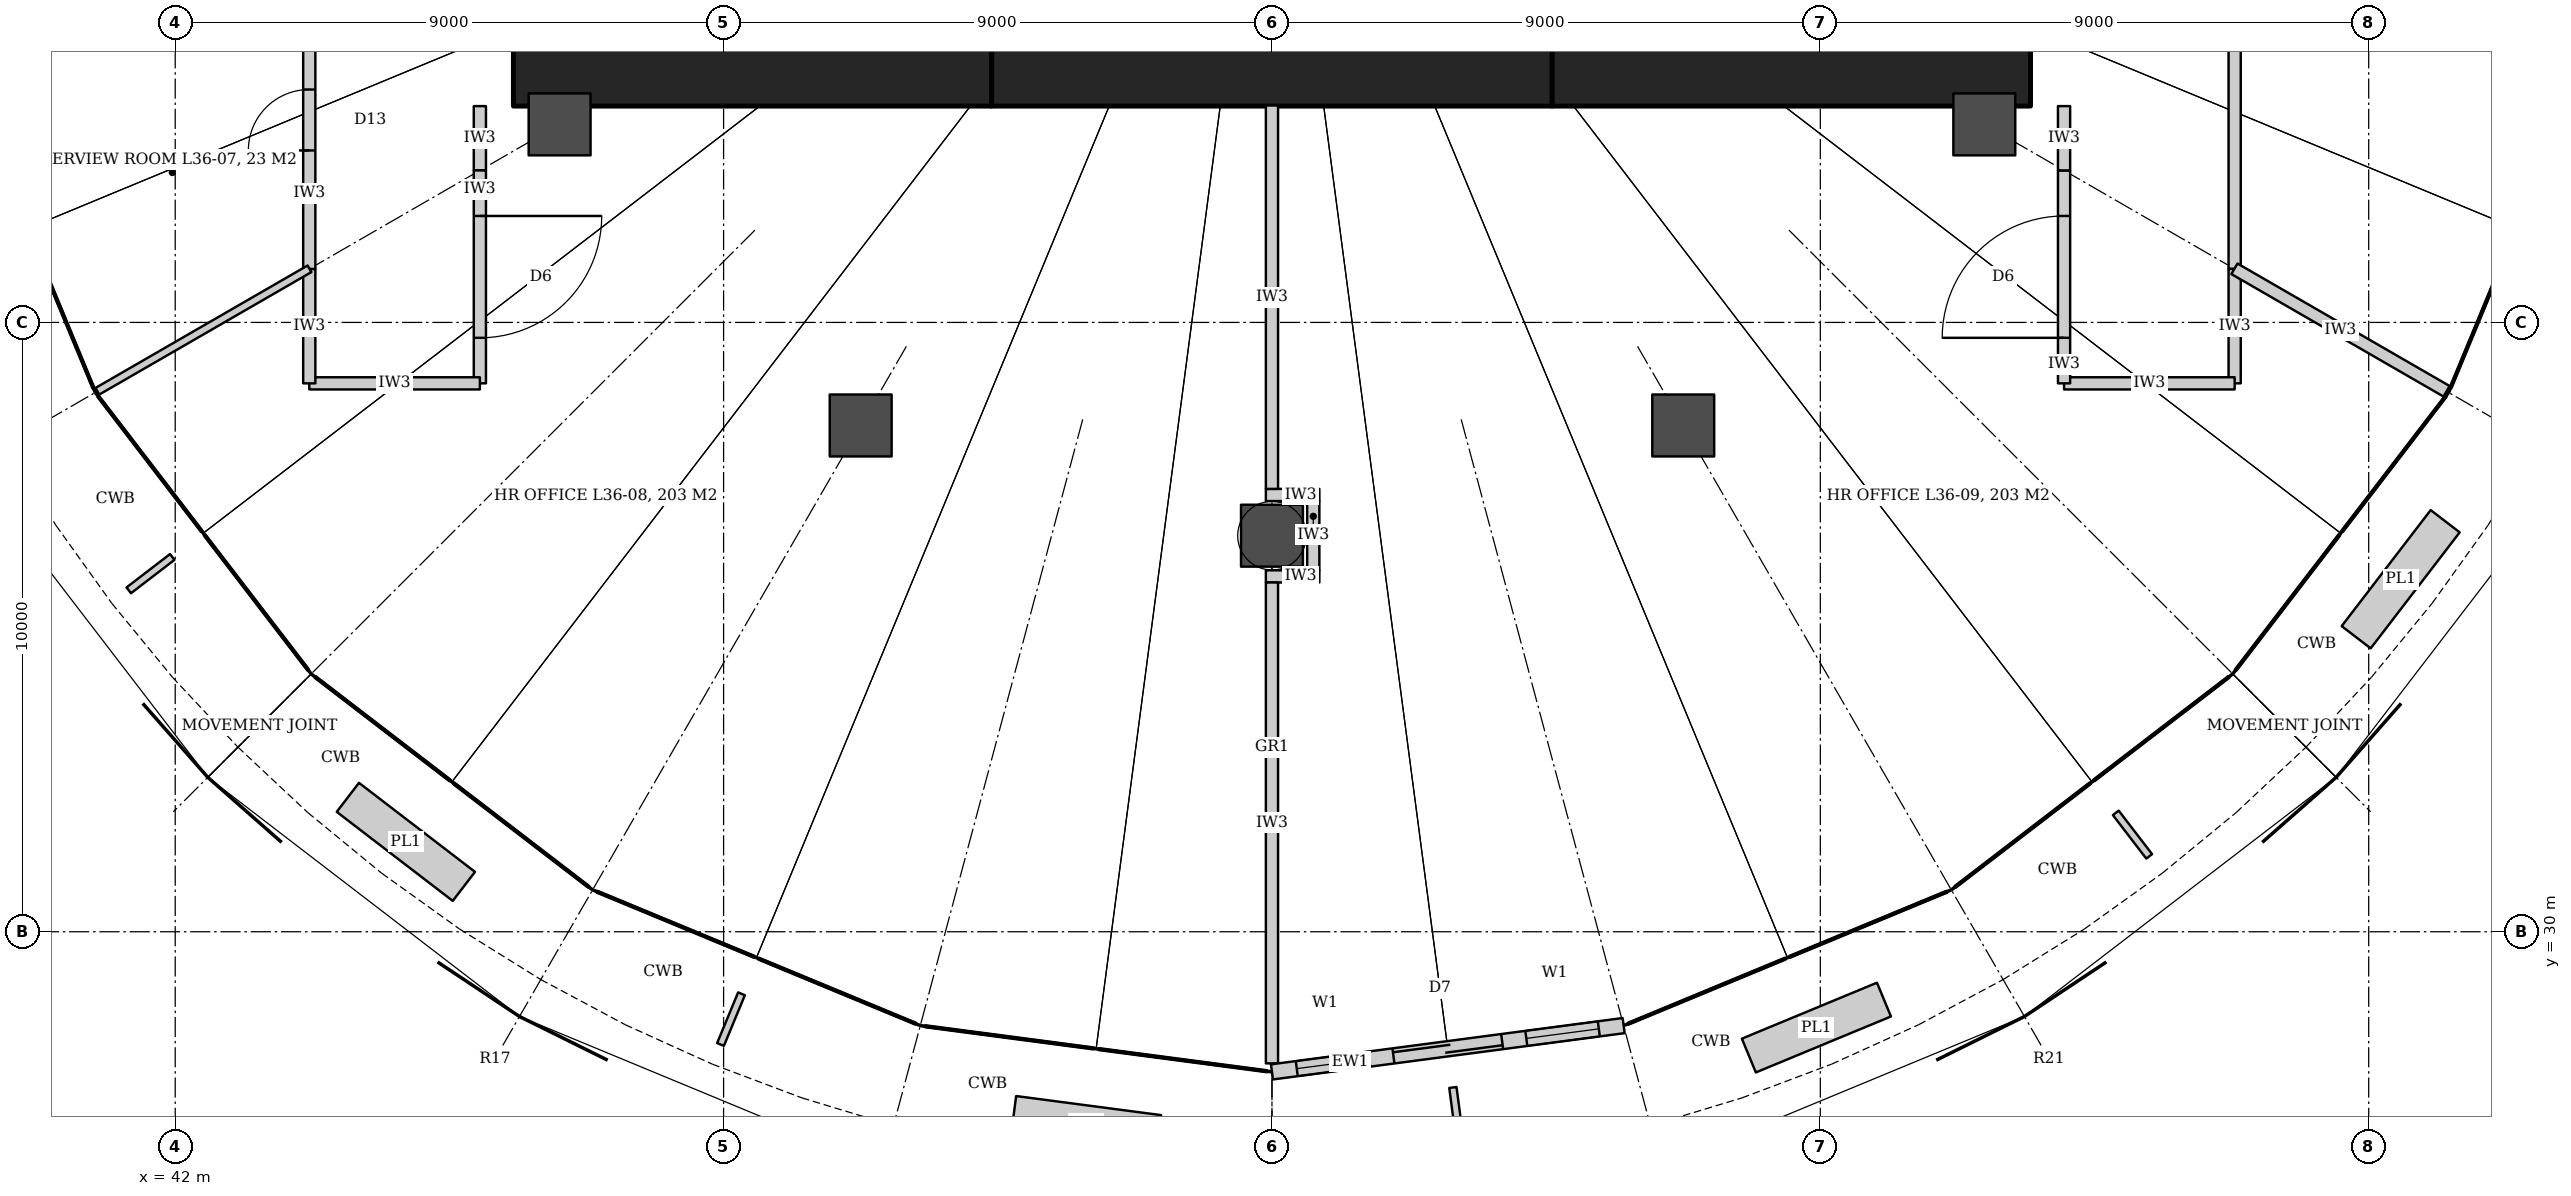
"""IFC4 building model, lengths in metres.
Left out: names, types, materials, properties, quantities, classifications, styles, units other than length and angle.
Written with IfcOpenShell. Run it as: python <this file> out.ifc"""

import sys

from ifc_helpers import new_model, si_unit, direction, frame, frame_2d, origin, origin_2d, place, context, subcontext, project, spatial, rectangle, hollow_circle, extrude, element, fill, save


model = new_model("IFC4")
c1 = context("Model", 3, precision=1e-05, world=origin(), true_north=direction((0.0, 1.0)))
c2 = subcontext(c1, "Body", "Model", "MODEL_VIEW")
j1 = project(units=[si_unit("LENGTHUNIT", "METRE"), si_unit("PLANEANGLEUNIT", "RADIAN")], contexts=[c1])
p1 = place(None, origin())
s1 = spatial("IfcSite", under=j1, at=p1, CompositionType="ELEMENT")
p2 = place(p1, origin())
s2 = spatial("IfcBuilding", under=s1, at=p2, CompositionType="ELEMENT")
p3 = place(p2, frame((0.0, 0.0, 160.4)))
s3 = spatial("IfcBuildingStorey", under=s2, at=p3, CompositionType="ELEMENT", Elevation=160.4)
p4 = place(p3, frame((47.55, 44.45, 0.0), z_axis=(0.0, 0.0, 1.0), x_axis=(1.0, 0.0, 0.0)))
e1 = element("IfcWall", 1, at=p4, inside=s3, PredefinedType="SHEAR", context=c2, shape_type="SweptSolid", body=[
    extrude(rectangle(XDim=7.85, YDim=1.8, at=frame_2d((3.925, 0.0))), origin(), (0.0, 0.0, 1.0), 4.2),
])
p5 = place(p3, frame((55.4, 44.45, 0.0), z_axis=(0.0, 0.0, 1.0), x_axis=(1.0, 0.0, 0.0)))
e2 = element("IfcWall", 2, at=p5, inside=s3, PredefinedType="SHEAR", context=c2, shape_type="SweptSolid", body=[
    extrude(rectangle(XDim=9.2, YDim=1.8, at=frame_2d((4.6, 0.0))), origin(), (0.0, 0.0, 1.0), 4.2),
])
p6 = place(p3, frame((64.6, 44.45, 0.0), z_axis=(0.0, 0.0, 1.0), x_axis=(1.0, 0.0, 0.0)))
e3 = element("IfcWall", 3, at=p6, inside=s3, PredefinedType="SHEAR", context=c2, shape_type="SweptSolid", body=[
    extrude(rectangle(XDim=7.85, YDim=1.8, at=frame_2d((3.925, 0.0))), origin(), (0.0, 0.0, 1.0), 4.2),
])
for number, where, z_axis, x_axis in (
    (4, (48.309, 43.25, 0.0), (0.0, 0.0, 1.0), (1.0, 0.0, 0.0)),
    (5, (53.25, 38.309, 0.0), (0.0, 0.0, 1.0), (1.0, 0.0, 0.0)),
    (6, (60.0, 36.5, 0.0), (0.0, 0.0, 1.0), (1.0, 0.0, 0.0)),
    (7, (66.75, 38.309, 0.0), (0.0, 0.0, 1.0), (1.0, 0.0, 0.0)),
    (8, (71.691, 43.25, 0.0), (0.0, 0.0, 1.0), (1.0, 0.0, 0.0)),
):
    element("IfcColumn", number, at=place(p3, frame(where, z_axis=z_axis, x_axis=x_axis)), inside=s3, PredefinedType="COLUMN", context=c2, shape_type="SweptSolid", body=[
        extrude(hollow_circle(Radius=0.508, WallThickness=0.05, at=origin_2d()), origin(), (0.0, 0.0, 1.0), 4.2),
    ])
p7 = place(p3, frame((75.8, 50.0, 0.0), z_axis=(0.0, 0.0, 1.0), x_axis=(0.0, -1.0, 0.0)))
e9 = element("IfcWall", 9, at=p7, inside=s3, PredefinedType="PARTITIONING", context=c2, shape_type="SweptSolid", body=[
    extrude(rectangle(XDim=9.122, YDim=0.2, at=frame_2d((4.561, 0.0))), origin(), (0.0, 0.0, 1.0), 3.012),
])
p8 = place(p7, frame((4.061, 0.0, 0.0)))
e10 = element("IfcOpeningElement", 10, at=p8, cuts=e9, PredefinedType="OPENING", context=c2, shape_type="SweptSolid", body=[
    extrude(rectangle(XDim=1.0, YDim=2.1, at=frame_2d((0.5, 1.05))), frame((0.0, 0.11, 0.0), z_axis=(0.0, -1.0, 0.0), x_axis=(1.0, 0.0, 0.0)), (0.0, 0.0, 1.0), 0.22),
])
p9 = place(p3, frame((75.8, 40.878, 0.0), z_axis=(0.0, 0.0, 1.0), x_axis=(0.0, -1.0, 0.0)))
e11 = element("IfcWall", 11, at=p9, inside=s3, PredefinedType="PARTITIONING", context=c2, shape_type="SweptSolid", body=[
    extrude(rectangle(XDim=1.878, YDim=0.2, at=frame_2d((0.939, 0.0))), origin(), (0.0, 0.0, 1.0), 3.012),
])
p10 = place(p3, frame((75.8, 39.0, 0.0), z_axis=(0.0, 0.0, 1.0), x_axis=(-1.0, 0.0, 0.0)))
e12 = element("IfcWall", 12, at=p10, inside=s3, PredefinedType="PARTITIONING", context=c2, shape_type="SweptSolid", body=[
    extrude(rectangle(XDim=2.8, YDim=0.2, at=frame_2d((1.4, 0.0))), origin(), (0.0, 0.0, 1.0), 3.04),
])
p11 = place(p3, frame((73.0, 39.0, 0.0), z_axis=(0.0, 0.0, 1.0), x_axis=(0.0, 1.0, 0.0)))
e13 = element("IfcWall", 13, at=p11, inside=s3, PredefinedType="PARTITIONING", context=c2, shape_type="SweptSolid", body=[
    extrude(rectangle(XDim=3.494, YDim=0.2, at=frame_2d((1.747, 0.0))), origin(), (0.0, 0.0, 1.0), 3.012),
])
p12 = place(p11, frame((0.747, 0.0, 0.0)))
e14 = element("IfcOpeningElement", 14, at=p12, cuts=e13, PredefinedType="OPENING", context=c2, shape_type="SweptSolid", body=[
    extrude(rectangle(XDim=2.0, YDim=2.1, at=frame_2d((1.0, 1.05))), frame((0.0, 0.11, 0.0), z_axis=(0.0, -1.0, 0.0), x_axis=(1.0, 0.0, 0.0)), (0.0, 0.0, 1.0), 0.22),
])
for number, where, z_axis, x_axis in (
    (15, (73.0, 42.494, 0.0), (0.0, 0.0, 1.0), (0.0, 1.0, 0.0)),
    (16, (47.0, 43.55, 0.0), (0.0, 0.0, 1.0), (0.0, -1.0, 0.0)),
):
    element("IfcWall", number, at=place(p3, frame(where, z_axis=z_axis, x_axis=x_axis)), inside=s3, PredefinedType="PARTITIONING", context=c2, shape_type="SweptSolid", body=[
        extrude(rectangle(XDim=1.056, YDim=0.2, at=frame_2d((0.528, 0.0))), origin(), (0.0, 0.0, 1.0), 3.012),
    ])
p13 = place(p3, frame((47.0, 42.494, 0.0), z_axis=(0.0, 0.0, 1.0), x_axis=(0.0, -1.0, 0.0)))
e17 = element("IfcWall", 17, at=p13, inside=s3, PredefinedType="PARTITIONING", context=c2, shape_type="SweptSolid", body=[
    extrude(rectangle(XDim=3.494, YDim=0.2, at=frame_2d((1.747, 0.0))), origin(), (0.0, 0.0, 1.0), 3.012),
])
p14 = place(p13, frame((0.747, 0.0, 0.0)))
e18 = element("IfcOpeningElement", 18, at=p14, cuts=e17, PredefinedType="OPENING", context=c2, shape_type="SweptSolid", body=[
    extrude(rectangle(XDim=2.0, YDim=2.1, at=frame_2d((1.0, 1.05))), frame((0.0, 0.11, 0.0), z_axis=(0.0, -1.0, 0.0), x_axis=(1.0, 0.0, 0.0)), (0.0, 0.0, 1.0), 0.22),
])
p15 = place(p3, frame((47.0, 39.0, 0.0), z_axis=(0.0, 0.0, 1.0), x_axis=(-1.0, 0.0, 0.0)))
e19 = element("IfcWall", 19, at=p15, inside=s3, PredefinedType="PARTITIONING", context=c2, shape_type="SweptSolid", body=[
    extrude(rectangle(XDim=2.8, YDim=0.2, at=frame_2d((1.4, 0.0))), origin(), (0.0, 0.0, 1.0), 3.04),
])
p16 = place(p3, frame((44.2, 39.0, 0.0), z_axis=(0.0, 0.0, 1.0), x_axis=(0.0, 1.0, 0.0)))
e20 = element("IfcWall", 20, at=p16, inside=s3, PredefinedType="PARTITIONING", context=c2, shape_type="SweptSolid", body=[
    extrude(rectangle(XDim=1.878, YDim=0.2, at=frame_2d((0.939, 0.0))), origin(), (0.0, 0.0, 1.0), 3.012),
])
p17 = place(p3, frame((44.2, 40.878, 0.0), z_axis=(0.0, 0.0, 1.0), x_axis=(0.0, 1.0, 0.0)))
e21 = element("IfcWall", 21, at=p17, inside=s3, PredefinedType="PARTITIONING", context=c2, shape_type="SweptSolid", body=[
    extrude(rectangle(XDim=4.888, YDim=0.2, at=frame_2d((2.444, 0.0))), origin(), (0.0, 0.0, 1.0), 3.012),
])
p18 = place(p17, frame((1.944, 0.0, 0.0)))
e22 = element("IfcOpeningElement", 22, at=p18, cuts=e21, PredefinedType="OPENING", context=c2, shape_type="SweptSolid", body=[
    extrude(rectangle(XDim=1.0, YDim=2.4, at=frame_2d((0.5, 1.2))), frame((0.0, 0.11, 0.0), z_axis=(0.0, -1.0, 0.0), x_axis=(1.0, 0.0, 0.0)), (0.0, 0.0, 1.0), 0.22),
])
p19 = place(p3, frame((44.198, 45.766, 0.0), z_axis=(0.0, 0.0, 1.0), x_axis=(-0.965932457036, -0.258794297549, 0.0)))
e23 = element("IfcWall", 23, at=p19, inside=s3, PredefinedType="PARTITIONING", context=c2, shape_type="SweptSolid", body=[
    extrude(rectangle(XDim=5.8, YDim=0.125, at=frame_2d((2.9, 0.0))), origin(), (0.0, 0.0, 1.0), 3.012),
])
p20 = place(p3, frame((44.204, 40.88, 0.0), z_axis=(0.0, 0.0, 1.0), x_axis=(-0.866036909293, -0.499980071345, 0.0)))
e24 = element("IfcWall", 24, at=p20, inside=s3, PredefinedType="PARTITIONING", context=c2, shape_type="SweptSolid", body=[
    extrude(rectangle(XDim=4.02, YDim=0.125, at=frame_2d((2.01, 0.0))), origin(), (0.0, 0.0, 1.0), 3.012),
])
for number, where, z_axis, x_axis in (
    (25, (59.9, 37.168, 0.0), (0.0, 0.0, 1.0), (1.0, 0.0, 0.0)),
    (26, (59.9, 35.832, 0.0), (0.0, 0.0, 1.0), (1.0, 0.0, 0.0)),
):
    element("IfcWall", number, at=place(p3, frame(where, z_axis=z_axis, x_axis=x_axis)), inside=s3, PredefinedType="PARTITIONING", context=c2, shape_type="SweptSolid", body=[
        extrude(rectangle(XDim=0.878, YDim=0.2, at=frame_2d((0.439, 0.0))), origin(), (0.0, 0.0, 1.0), 3.012),
    ])
p21 = place(p3, frame((60.678, 37.068, 0.0), z_axis=(0.0, 0.0, 1.0), x_axis=(0.0, -1.0, 0.0)))
e27 = element("IfcWall", 27, at=p21, inside=s3, PredefinedType="PARTITIONING", context=c2, shape_type="SweptSolid", body=[
    extrude(rectangle(XDim=1.136, YDim=0.2, at=frame_2d((0.568, 0.0))), origin(), (0.0, 0.0, 1.0), 3.012),
])
p22 = place(p3, frame((60.0, 43.56, 0.0), z_axis=(0.0, 0.0, 1.0), x_axis=(0.0, -1.0, 0.0)))
e28 = element("IfcWall", 28, at=p22, inside=s3, PredefinedType="PARTITIONING", context=c2, shape_type="SweptSolid", body=[
    extrude(rectangle(XDim=6.292, YDim=0.2, at=frame_2d((3.146, 0.0))), origin(), (0.0, 0.0, 1.0), 3.04),
])
p23 = place(p3, frame((60.0, 35.732, 0.0), z_axis=(0.0, 0.0, 1.0), x_axis=(0.0, -1.0, 0.0)))
e29 = element("IfcWall", 29, at=p23, inside=s3, PredefinedType="PARTITIONING", context=c2, shape_type="SweptSolid", body=[
    extrude(rectangle(XDim=7.892, YDim=0.2, at=frame_2d((3.946, 0.0))), origin(), (0.0, 0.0, 1.0), 3.012),
])
p24 = place(p3, frame((75.796, 40.88, 0.0), z_axis=(0.0, 0.0, 1.0), x_axis=(0.866036909293, -0.499980071345, 0.0)))
e30 = element("IfcWall", 30, at=p24, inside=s3, PredefinedType="PARTITIONING", context=c2, shape_type="SweptSolid", body=[
    extrude(rectangle(XDim=4.02, YDim=0.2, at=frame_2d((2.01, 0.0))), origin(), (0.0, 0.0, 1.0), 3.012),
])
p25 = place(p3, frame((60.0, 27.7, 0.0), z_axis=(0.0, 0.0, 1.0), x_axis=(0.99144158687, 0.130551062135, 0.0)))
e31 = element("IfcWall", 31, at=p25, inside=s3, PredefinedType="SOLIDWALL", context=c2, shape_type="SweptSolid", body=[
    extrude(rectangle(XDim=5.822, YDim=0.25, at=frame_2d((2.911, 0.0))), origin(), (0.0, 0.0, 1.0), 4.04),
])
p26 = place(p25, frame((2.011, 0.0, 0.0)))
e32 = element("IfcOpeningElement", 32, at=p26, cuts=e31, PredefinedType="OPENING", context=c2, shape_type="SweptSolid", body=[
    extrude(rectangle(XDim=1.8, YDim=2.4, at=frame_2d((0.9, 1.2))), frame((0.0, 0.135, 0.0), z_axis=(0.0, -1.0, 0.0), x_axis=(1.0, 0.0, 0.0)), (0.0, 0.0, 1.0), 0.27),
])
p27 = place(p25, frame((0.411, 0.0, 0.0)))
e33 = element("IfcOpeningElement", 33, at=p27, cuts=e31, PredefinedType="OPENING", context=c2, shape_type="SweptSolid", body=[
    extrude(rectangle(XDim=1.2, YDim=2.4, at=frame_2d((0.6, 1.2))), frame((0.0, 0.135, 0.0), z_axis=(0.0, -1.0, 0.0), x_axis=(1.0, 0.0, 0.0)), (0.0, 0.0, 1.0), 0.27),
])
p28 = place(p25, frame((4.211, 0.0, 0.0)))
e34 = element("IfcOpeningElement", 34, at=p28, cuts=e31, PredefinedType="OPENING", context=c2, shape_type="SweptSolid", body=[
    extrude(rectangle(XDim=1.2, YDim=2.4, at=frame_2d((0.6, 1.2))), frame((0.0, 0.135, 0.0), z_axis=(0.0, -1.0, 0.0), x_axis=(1.0, 0.0, 0.0)), (0.0, 0.0, 1.0), 0.27),
])
p29 = place(p18, origin())
e35 = element("IfcDoor", 35, at=p29, inside=s3, OperationType="SINGLE_SWING_LEFT", PredefinedType="DOOR", context=c2, shape_type="SweptSolid", body=[
    extrude(rectangle(XDim=1.0, YDim=2.4, at=frame_2d((0.5, 1.2))), frame((0.0, 0.025, 0.0), z_axis=(0.0, -1.0, 0.0), x_axis=(1.0, 0.0, 0.0)), (0.0, 0.0, 1.0), 0.05),
])
fill(e22, e35)
p30 = place(p14, origin())
e36 = element("IfcDoor", 36, at=p30, inside=s3, OperationType="DOUBLE_DOOR_DOUBLE_SWING", PredefinedType="DOOR", context=c2, shape_type="SweptSolid", body=[
    extrude(rectangle(XDim=2.0, YDim=2.1, at=frame_2d((1.0, 1.05))), frame((0.0, 0.025, 0.0), z_axis=(0.0, -1.0, 0.0), x_axis=(1.0, 0.0, 0.0)), (0.0, 0.0, 1.0), 0.05),
])
fill(e18, e36)
p31 = place(p12, origin())
e37 = element("IfcDoor", 37, at=p31, inside=s3, OperationType="DOUBLE_DOOR_DOUBLE_SWING", PredefinedType="DOOR", context=c2, shape_type="SweptSolid", body=[
    extrude(rectangle(XDim=2.0, YDim=2.1, at=frame_2d((1.0, 1.05))), frame((0.0, 0.025, 0.0), z_axis=(0.0, -1.0, 0.0), x_axis=(1.0, 0.0, 0.0)), (0.0, 0.0, 1.0), 0.05),
])
fill(e14, e37)
p32 = place(p26, origin())
e38 = element("IfcDoor", 38, at=p32, inside=s3, OperationType="DOUBLE_DOOR_SLIDING", PredefinedType="DOOR", context=c2, shape_type="SweptSolid", body=[
    extrude(rectangle(XDim=1.8, YDim=2.4, at=frame_2d((0.9, 1.2))), frame((0.0, 0.025, 0.0), z_axis=(0.0, -1.0, 0.0), x_axis=(1.0, 0.0, 0.0)), (0.0, 0.0, 1.0), 0.05),
])
fill(e32, e38)
p33 = place(p27, origin())
e39 = element("IfcWindow", 39, at=p33, inside=s3, PartitioningType="SINGLE_PANEL", PredefinedType="WINDOW", context=c2, shape_type="SweptSolid", body=[
    extrude(rectangle(XDim=1.2, YDim=2.4, at=frame_2d((0.6, 1.2))), frame((0.0, 0.03, 0.0), z_axis=(0.0, -1.0, 0.0), x_axis=(1.0, 0.0, 0.0)), (0.0, 0.0, 1.0), 0.06),
])
fill(e33, e39)
p34 = place(p28, origin())
e40 = element("IfcWindow", 40, at=p34, inside=s3, PartitioningType="SINGLE_PANEL", PredefinedType="WINDOW", context=c2, shape_type="SweptSolid", body=[
    extrude(rectangle(XDim=1.2, YDim=2.4, at=frame_2d((0.6, 1.2))), frame((0.0, 0.03, 0.0), z_axis=(0.0, -1.0, 0.0), x_axis=(1.0, 0.0, 0.0)), (0.0, 0.0, 1.0), 0.06),
])
fill(e34, e40)
save(model, sys.argv[1])
